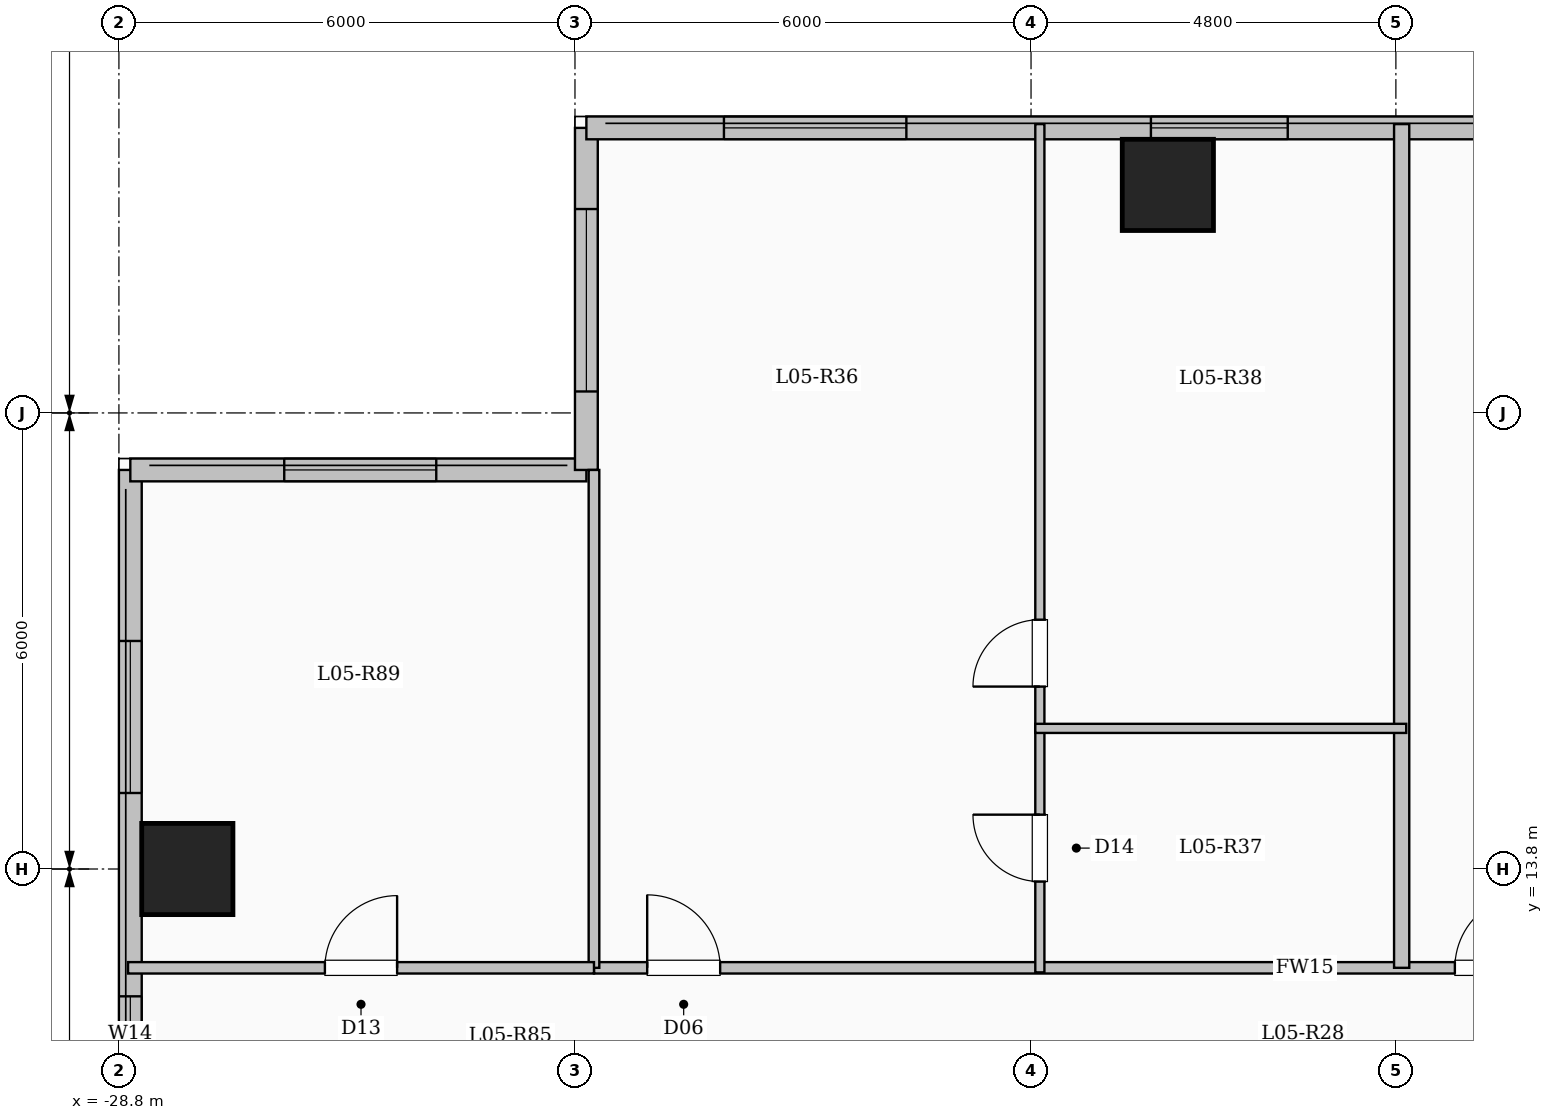
"""IFC4 building model, lengths in metres.
Left out: names, types, materials, properties, quantities, classifications, styles, units other than length and angle.
Written with IfcOpenShell. Run it as: python <this file> out.ifc"""

import sys

from ifc_helpers import new_model, si_unit, direction, frame, frame_2d, origin, origin_2d, place, context, subcontext, project, spatial, rectangle, extrude, element, fill, save


model = new_model("IFC4")
c1 = context("Model", 3, precision=1e-05, world=origin(), true_north=direction((0.0, 1.0)))
c2 = subcontext(c1, "Body", "Model", "MODEL_VIEW")
j1 = project(units=[si_unit("LENGTHUNIT", "METRE"), si_unit("PLANEANGLEUNIT", "RADIAN")], contexts=[c1])
p1 = place(None, origin())
s1 = spatial("IfcSite", under=j1, at=p1, CompositionType="ELEMENT")
p2 = place(p1, origin())
s2 = spatial("IfcBuilding", under=s1, at=p2, CompositionType="ELEMENT")
p3 = place(p2, frame((0.0, 0.0, 24.0)))
s3 = spatial("IfcBuildingStorey", under=s2, at=p3, CompositionType="ELEMENT", Elevation=24.0)
for number, where, z_axis, x_axis in (
    (1, (-15.0, 22.8, 0.0), (0.0, 0.0, 1.0), (1.0, 0.0, 0.0)),
    (2, (-27.9, 13.8, 0.0), (0.0, 0.0, 1.0), (1.0, 0.0, 0.0)),
):
    element("IfcColumn", number, at=place(p3, frame(where, z_axis=z_axis, x_axis=x_axis)), inside=s3, PredefinedType="COLUMN", context=c2, shape_type="SweptSolid", body=[
        extrude(rectangle(XDim=1.2, YDim=1.2, at=origin_2d()), origin(), (0.0, 0.0, 1.0), 3.35),
    ])
p4 = place(p3, frame((-28.65, -19.05, 0.0), z_axis=(0.0, 0.0, 1.0), x_axis=(0.0, 1.0, 0.0)))
e3 = element("IfcWall", 3, at=p4, inside=s3, PredefinedType="SOLIDWALL", context=c2, shape_type="SweptSolid", body=[
    extrude(rectangle(XDim=38.1, YDim=0.3, at=frame_2d((19.05, 0.0))), origin(), (0.0, 0.0, 1.0), 3.1),
])
p5 = place(p4, frame((3.15, 0.0, 0.9)))
e4 = element("IfcOpeningElement", 4, at=p5, cuts=e3, PredefinedType="OPENING", context=c2, shape_type="SweptSolid", body=[
    extrude(rectangle(XDim=2.4, YDim=1.8, at=frame_2d((1.2, 0.9))), frame((0.0, 0.16, 0.0), z_axis=(0.0, -1.0, 0.0), x_axis=(1.0, 0.0, 0.0)), (0.0, 0.0, 1.0), 0.32),
])
p6 = place(p4, frame((9.542, 0.0, 0.9)))
e5 = element("IfcOpeningElement", 5, at=p6, cuts=e3, PredefinedType="OPENING", context=c2, shape_type="SweptSolid", body=[
    extrude(rectangle(XDim=1.5, YDim=1.65, at=frame_2d((0.75, 0.825))), frame((0.0, 0.16, 0.0), z_axis=(0.0, -1.0, 0.0), x_axis=(1.0, 0.0, 0.0)), (0.0, 0.0, 1.0), 0.32),
])
p7 = place(p4, frame((14.95, 0.0, 0.9)))
e6 = element("IfcOpeningElement", 6, at=p7, cuts=e3, PredefinedType="OPENING", context=c2, shape_type="SweptSolid", body=[
    extrude(rectangle(XDim=2.4, YDim=1.8, at=frame_2d((1.2, 0.9))), frame((0.0, 0.16, 0.0), z_axis=(0.0, -1.0, 0.0), x_axis=(1.0, 0.0, 0.0)), (0.0, 0.0, 1.0), 0.32),
])
p8 = place(p4, frame((21.375, 0.0, 0.9)))
e7 = element("IfcOpeningElement", 7, at=p8, cuts=e3, PredefinedType="OPENING", context=c2, shape_type="SweptSolid", body=[
    extrude(rectangle(XDim=1.8, YDim=1.65, at=frame_2d((0.9, 0.825))), frame((0.0, 0.16, 0.0), z_axis=(0.0, -1.0, 0.0), x_axis=(1.0, 0.0, 0.0)), (0.0, 0.0, 1.0), 0.32),
])
p9 = place(p4, frame((25.925, 0.0, 0.9)))
e8 = element("IfcOpeningElement", 8, at=p9, cuts=e3, PredefinedType="OPENING", context=c2, shape_type="SweptSolid", body=[
    extrude(rectangle(XDim=2.0, YDim=1.7, at=frame_2d((1.0, 0.85))), frame((0.0, 0.16, 0.0), z_axis=(0.0, -1.0, 0.0), x_axis=(1.0, 0.0, 0.0)), (0.0, 0.0, 1.0), 0.32),
])
p10 = place(p4, frame((30.175, 0.0, 0.95)))
e9 = element("IfcOpeningElement", 9, at=p10, cuts=e3, PredefinedType="OPENING", context=c2, shape_type="SweptSolid", body=[
    extrude(rectangle(XDim=1.0, YDim=1.5, at=frame_2d((0.5, 0.75))), frame((0.0, 0.16, 0.0), z_axis=(0.0, -1.0, 0.0), x_axis=(1.0, 0.0, 0.0)), (0.0, 0.0, 1.0), 0.32),
])
p11 = place(p4, frame((33.85, 0.0, 0.9)))
e10 = element("IfcOpeningElement", 10, at=p11, cuts=e3, PredefinedType="OPENING", context=c2, shape_type="SweptSolid", body=[
    extrude(rectangle(XDim=2.0, YDim=1.7, at=frame_2d((1.0, 0.85))), frame((0.0, 0.16, 0.0), z_axis=(0.0, -1.0, 0.0), x_axis=(1.0, 0.0, 0.0)), (0.0, 0.0, 1.0), 0.32),
])
p12 = place(p3, frame((-28.65, 19.05, 0.0), z_axis=(0.0, 0.0, 1.0), x_axis=(1.0, 0.0, 0.0)))
e11 = element("IfcWall", 11, at=p12, inside=s3, PredefinedType="SOLIDWALL", context=c2, shape_type="SweptSolid", body=[
    extrude(rectangle(XDim=6.0, YDim=0.3, at=frame_2d((3.0, 0.0))), origin(), (0.0, 0.0, 1.0), 3.1),
])
p13 = place(p12, frame((2.025, 0.0, 0.9)))
e12 = element("IfcOpeningElement", 12, at=p13, cuts=e11, PredefinedType="OPENING", context=c2, shape_type="SweptSolid", body=[
    extrude(rectangle(XDim=2.0, YDim=1.7, at=frame_2d((1.0, 0.85))), frame((0.0, 0.16, 0.0), z_axis=(0.0, -1.0, 0.0), x_axis=(1.0, 0.0, 0.0)), (0.0, 0.0, 1.0), 0.32),
])
p14 = place(p3, frame((-22.65, 19.05, 0.0), z_axis=(0.0, 0.0, 1.0), x_axis=(0.0, 1.0, 0.0)))
e13 = element("IfcWall", 13, at=p14, inside=s3, PredefinedType="SOLIDWALL", context=c2, shape_type="SweptSolid", body=[
    extrude(rectangle(XDim=4.5, YDim=0.3, at=frame_2d((2.25, 0.0))), origin(), (0.0, 0.0, 1.0), 3.1),
])
p15 = place(p14, frame((1.032, 0.0, 0.9)))
e14 = element("IfcOpeningElement", 14, at=p15, cuts=e13, PredefinedType="OPENING", context=c2, shape_type="SweptSolid", body=[
    extrude(rectangle(XDim=2.4, YDim=1.8, at=frame_2d((1.2, 0.9))), frame((0.0, 0.16, 0.0), z_axis=(0.0, -1.0, 0.0), x_axis=(1.0, 0.0, 0.0)), (0.0, 0.0, 1.0), 0.32),
])
p16 = place(p3, frame((-22.65, 23.55, 0.0), z_axis=(0.0, 0.0, 1.0), x_axis=(1.0, 0.0, 0.0)))
e15 = element("IfcWall", 15, at=p16, inside=s3, PredefinedType="SOLIDWALL", context=c2, shape_type="SweptSolid", body=[
    extrude(rectangle(XDim=15.3, YDim=0.3, at=frame_2d((7.65, 0.0))), origin(), (0.0, 0.0, 1.0), 3.1),
])
p17 = place(p16, frame((1.81, 0.0, 0.9)))
e16 = element("IfcOpeningElement", 16, at=p17, cuts=e15, PredefinedType="OPENING", context=c2, shape_type="SweptSolid", body=[
    extrude(rectangle(XDim=2.4, YDim=1.8, at=frame_2d((1.2, 0.9))), frame((0.0, 0.16, 0.0), z_axis=(0.0, -1.0, 0.0), x_axis=(1.0, 0.0, 0.0)), (0.0, 0.0, 1.0), 0.32),
])
p18 = place(p16, frame((7.427, 0.0, 0.9)))
e17 = element("IfcOpeningElement", 17, at=p18, cuts=e15, PredefinedType="OPENING", context=c2, shape_type="SweptSolid", body=[
    extrude(rectangle(XDim=1.8, YDim=1.65, at=frame_2d((0.9, 0.825))), frame((0.0, 0.16, 0.0), z_axis=(0.0, -1.0, 0.0), x_axis=(1.0, 0.0, 0.0)), (0.0, 0.0, 1.0), 0.32),
])
p19 = place(p16, frame((11.868, 0.0, 0.9)))
e18 = element("IfcOpeningElement", 18, at=p19, cuts=e15, PredefinedType="OPENING", context=c2, shape_type="SweptSolid", body=[
    extrude(rectangle(XDim=2.4, YDim=1.8, at=frame_2d((1.2, 0.9))), frame((0.0, 0.16, 0.0), z_axis=(0.0, -1.0, 0.0), x_axis=(1.0, 0.0, 0.0)), (0.0, 0.0, 1.0), 0.32),
])
p20 = place(p3, frame((-22.55, 12.5, 0.0), z_axis=(0.0, 0.0, 1.0), x_axis=(1.0, 0.0, 0.0)))
e19 = element("IfcWall", 19, at=p20, inside=s3, PredefinedType="PARTITIONING", context=c2, shape_type="SweptSolid", body=[
    extrude(rectangle(XDim=18.7, YDim=0.15, at=frame_2d((9.35, 0.0))), origin(), (0.0, 0.0, 1.0), 3.1),
])
p21 = place(p20, frame((0.7, 0.0, 0.0)))
e20 = element("IfcOpeningElement", 20, at=p21, cuts=e19, PredefinedType="OPENING", context=c2, shape_type="SweptSolid", body=[
    extrude(rectangle(XDim=0.96, YDim=2.15, at=frame_2d((0.48, 1.075))), frame((0.0, 0.085, 0.0), z_axis=(0.0, -1.0, 0.0), x_axis=(1.0, 0.0, 0.0)), (0.0, 0.0, 1.0), 0.17),
])
p22 = place(p20, frame((11.326, 0.0, 0.0)))
e21 = element("IfcOpeningElement", 21, at=p22, cuts=e19, PredefinedType="OPENING", context=c2, shape_type="SweptSolid", body=[
    extrude(rectangle(XDim=0.96, YDim=2.15, at=frame_2d((0.48, 1.075))), frame((0.0, 0.085, 0.0), z_axis=(0.0, -1.0, 0.0), x_axis=(1.0, 0.0, 0.0)), (0.0, 0.0, 1.0), 0.17),
])
p23 = place(p3, frame((-11.924, 12.5, 0.0), z_axis=(0.0, 0.0, 1.0), x_axis=(0.0, 1.0, 0.0)))
e22 = element("IfcWall", 22, at=p23, inside=s3, PredefinedType="SOLIDWALL", context=c2, shape_type="SweptSolid", body=[
    extrude(rectangle(XDim=11.1, YDim=0.2, at=frame_2d((5.55, 0.0))), origin(), (0.0, 0.0, 1.0), 3.1),
])
p24 = place(p3, frame((-16.684, 12.44, 0.0), z_axis=(0.0, 0.0, 1.0), x_axis=(0.0, 1.0, 0.0)))
e23 = element("IfcWall", 23, at=p24, inside=s3, PredefinedType="PARTITIONING", context=c2, shape_type="SweptSolid", body=[
    extrude(rectangle(XDim=3.21, YDim=0.12, at=frame_2d((1.605, 0.0))), origin(), (0.0, 0.0, 1.0), 3.1),
])
p25 = place(p24, frame((1.195, 0.0, 0.0)))
e24 = element("IfcOpeningElement", 24, at=p25, cuts=e23, PredefinedType="OPENING", context=c2, shape_type="SweptSolid", body=[
    extrude(rectangle(XDim=0.88, YDim=2.1, at=frame_2d((0.44, 1.05))), frame((0.0, 0.07, 0.0), z_axis=(0.0, -1.0, 0.0), x_axis=(1.0, 0.0, 0.0)), (0.0, 0.0, 1.0), 0.14),
])
p26 = place(p3, frame((-16.684, 15.65, 0.0), z_axis=(0.0, 0.0, 1.0), x_axis=(0.0, 1.0, 0.0)))
e25 = element("IfcWall", 25, at=p26, inside=s3, PredefinedType="PARTITIONING", context=c2, shape_type="SweptSolid", body=[
    extrude(rectangle(XDim=7.95, YDim=0.12, at=frame_2d((3.975, 0.0))), origin(), (0.0, 0.0, 1.0), 3.1),
])
p27 = place(p26, frame((0.55, 0.0, 0.0)))
e26 = element("IfcOpeningElement", 26, at=p27, cuts=e25, PredefinedType="OPENING", context=c2, shape_type="SweptSolid", body=[
    extrude(rectangle(XDim=0.88, YDim=2.1, at=frame_2d((0.44, 1.05))), frame((0.0, 0.07, 0.0), z_axis=(0.0, -1.0, 0.0), x_axis=(1.0, 0.0, 0.0)), (0.0, 0.0, 1.0), 0.14),
])
p28 = place(p3, frame((-16.744, 15.65, 0.0), z_axis=(0.0, 0.0, 1.0), x_axis=(1.0, 0.0, 0.0)))
e27 = element("IfcWall", 27, at=p28, inside=s3, PredefinedType="PARTITIONING", context=c2, shape_type="SweptSolid", body=[
    extrude(rectangle(XDim=4.88, YDim=0.12, at=frame_2d((2.44, 0.0))), origin(), (0.0, 0.0, 1.0), 3.1),
])
p29 = place(p3, frame((-22.55, 12.5, 0.0), z_axis=(0.0, 0.0, 1.0), x_axis=(0.0, 1.0, 0.0)))
e28 = element("IfcWall", 28, at=p29, inside=s3, PredefinedType="PARTITIONING", context=c2, shape_type="SweptSolid", body=[
    extrude(rectangle(XDim=6.55, YDim=0.14, at=frame_2d((3.275, 0.0))), origin(), (0.0, 0.0, 1.0), 3.1),
])
p30 = place(p3, frame((-28.68, 12.5, 0.0), z_axis=(0.0, 0.0, 1.0), x_axis=(1.0, 0.0, 0.0)))
e29 = element("IfcWall", 29, at=p30, inside=s3, PredefinedType="PARTITIONING", context=c2, shape_type="SweptSolid", body=[
    extrude(rectangle(XDim=6.13, YDim=0.15, at=frame_2d((3.065, 0.0))), origin(), (0.0, 0.0, 1.0), 3.1),
])
p31 = place(p30, frame((2.59, 0.0, 0.0)))
e30 = element("IfcOpeningElement", 30, at=p31, cuts=e29, PredefinedType="OPENING", context=c2, shape_type="SweptSolid", body=[
    extrude(rectangle(XDim=0.95, YDim=2.15, at=frame_2d((0.475, 1.075))), frame((0.0, 0.085, 0.0), z_axis=(0.0, -1.0, 0.0), x_axis=(1.0, 0.0, 0.0)), (0.0, 0.0, 1.0), 0.17),
])
p32 = place(p10, origin())
e31 = element("IfcWindow", 31, at=p32, inside=s3, PartitioningType="SINGLE_PANEL", PredefinedType="WINDOW", context=c2, shape_type="SweptSolid", body=[
    extrude(rectangle(XDim=1.0, YDim=1.5, at=frame_2d((0.5, 0.75))), frame((0.0, 0.03, 0.0), z_axis=(0.0, -1.0, 0.0), x_axis=(1.0, 0.0, 0.0)), (0.0, 0.0, 1.0), 0.06),
])
fill(e9, e31)
p33 = place(p11, origin())
e32 = element("IfcWindow", 32, at=p33, inside=s3, PartitioningType="SINGLE_PANEL", PredefinedType="WINDOW", context=c2, shape_type="SweptSolid", body=[
    extrude(rectangle(XDim=2.0, YDim=1.7, at=frame_2d((1.0, 0.85))), frame((0.0, 0.03, 0.0), z_axis=(0.0, -1.0, 0.0), x_axis=(1.0, 0.0, 0.0)), (0.0, 0.0, 1.0), 0.06),
])
fill(e10, e32)
p34 = place(p13, origin())
e33 = element("IfcWindow", 33, at=p34, inside=s3, PartitioningType="SINGLE_PANEL", PredefinedType="WINDOW", context=c2, shape_type="SweptSolid", body=[
    extrude(rectangle(XDim=2.0, YDim=1.7, at=frame_2d((1.0, 0.85))), frame((0.0, 0.03, 0.0), z_axis=(0.0, -1.0, 0.0), x_axis=(1.0, 0.0, 0.0)), (0.0, 0.0, 1.0), 0.06),
])
fill(e12, e33)
p35 = place(p15, origin())
e34 = element("IfcWindow", 34, at=p35, inside=s3, PartitioningType="SINGLE_PANEL", PredefinedType="WINDOW", context=c2, shape_type="SweptSolid", body=[
    extrude(rectangle(XDim=2.4, YDim=1.8, at=frame_2d((1.2, 0.9))), frame((0.0, 0.03, 0.0), z_axis=(0.0, -1.0, 0.0), x_axis=(1.0, 0.0, 0.0)), (0.0, 0.0, 1.0), 0.06),
])
fill(e14, e34)
p36 = place(p17, origin())
e35 = element("IfcWindow", 35, at=p36, inside=s3, PartitioningType="SINGLE_PANEL", PredefinedType="WINDOW", context=c2, shape_type="SweptSolid", body=[
    extrude(rectangle(XDim=2.4, YDim=1.8, at=frame_2d((1.2, 0.9))), frame((0.0, 0.03, 0.0), z_axis=(0.0, -1.0, 0.0), x_axis=(1.0, 0.0, 0.0)), (0.0, 0.0, 1.0), 0.06),
])
fill(e16, e35)
p37 = place(p18, origin())
e36 = element("IfcWindow", 36, at=p37, inside=s3, PartitioningType="SINGLE_PANEL", PredefinedType="WINDOW", context=c2, shape_type="SweptSolid", body=[
    extrude(rectangle(XDim=1.8, YDim=1.65, at=frame_2d((0.9, 0.825))), frame((0.0, 0.03, 0.0), z_axis=(0.0, -1.0, 0.0), x_axis=(1.0, 0.0, 0.0)), (0.0, 0.0, 1.0), 0.06),
])
fill(e17, e36)
p38 = place(p21, origin())
e37 = element("IfcDoor", 37, at=p38, inside=s3, OperationType="SINGLE_SWING_LEFT", PredefinedType="DOOR", context=c2, shape_type="SweptSolid", body=[
    extrude(rectangle(XDim=0.96, YDim=2.15, at=frame_2d((0.48, 1.075))), frame((0.0, 0.025, 0.0), z_axis=(0.0, -1.0, 0.0), x_axis=(1.0, 0.0, 0.0)), (0.0, 0.0, 1.0), 0.05),
])
fill(e20, e37)
p39 = place(p25, origin())
e38 = element("IfcDoor", 38, at=p39, inside=s3, OperationType="SINGLE_SWING_RIGHT", PredefinedType="DOOR", context=c2, shape_type="SweptSolid", body=[
    extrude(rectangle(XDim=0.88, YDim=2.1, at=frame_2d((0.44, 1.05))), frame((0.0, 0.025, 0.0), z_axis=(0.0, -1.0, 0.0), x_axis=(1.0, 0.0, 0.0)), (0.0, 0.0, 1.0), 0.05),
])
fill(e24, e38)
p40 = place(p27, origin())
e39 = element("IfcDoor", 39, at=p40, inside=s3, OperationType="SINGLE_SWING_LEFT", PredefinedType="DOOR", context=c2, shape_type="SweptSolid", body=[
    extrude(rectangle(XDim=0.88, YDim=2.1, at=frame_2d((0.44, 1.05))), frame((0.0, 0.025, 0.0), z_axis=(0.0, -1.0, 0.0), x_axis=(1.0, 0.0, 0.0)), (0.0, 0.0, 1.0), 0.05),
])
fill(e26, e39)
p41 = place(p22, origin())
e40 = element("IfcDoor", 40, at=p41, inside=s3, OperationType="SINGLE_SWING_RIGHT", PredefinedType="DOOR", context=c2, shape_type="SweptSolid", body=[
    extrude(rectangle(XDim=0.96, YDim=2.15, at=frame_2d((0.48, 1.075))), frame((0.0, 0.025, 0.0), z_axis=(0.0, -1.0, 0.0), x_axis=(1.0, 0.0, 0.0)), (0.0, 0.0, 1.0), 0.05),
])
fill(e21, e40)
p42 = place(p31, origin())
e41 = element("IfcDoor", 41, at=p42, inside=s3, OperationType="SINGLE_SWING_RIGHT", PredefinedType="DOOR", context=c2, shape_type="SweptSolid", body=[
    extrude(rectangle(XDim=0.95, YDim=2.15, at=frame_2d((0.475, 1.075))), frame((0.0, 0.025, 0.0), z_axis=(0.0, -1.0, 0.0), x_axis=(1.0, 0.0, 0.0)), (0.0, 0.0, 1.0), 0.05),
])
fill(e30, e41)
save(model, sys.argv[1])
